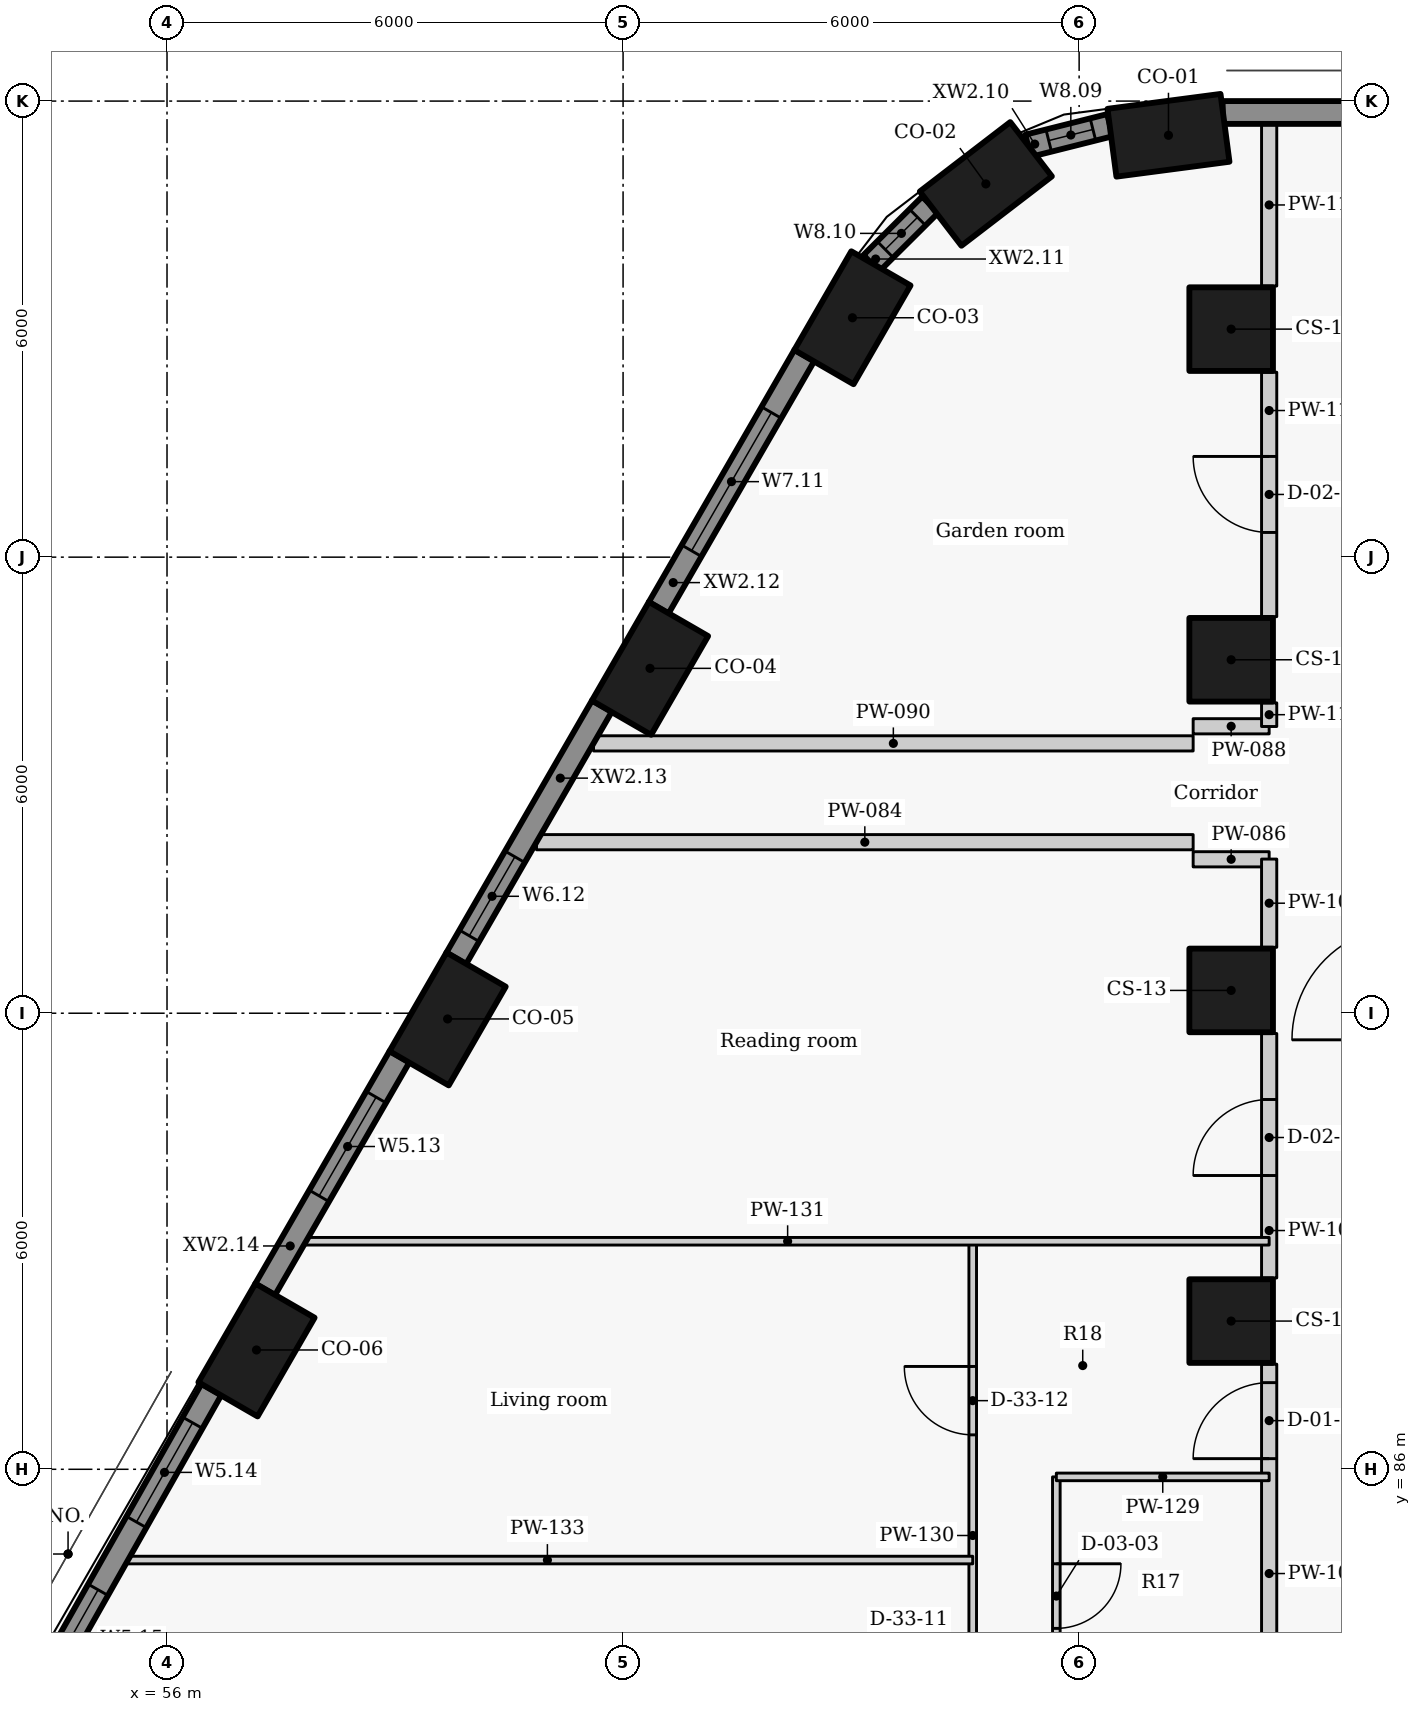
"""IFC4 building model, lengths in metres.
Left out: names, types, materials, properties, quantities, classifications, styles, units other than length and angle.
Written with IfcOpenShell. Run it as: python <this file> out.ifc"""

import sys

from ifc_helpers import new_model, si_unit, direction, frame, frame_2d, origin, origin_2d, place, context, subcontext, project, spatial, rectangle, extrude, element, fill, save


model = new_model("IFC4")
c1 = context("Model", 3, precision=1e-05, world=origin(), true_north=direction((0.0, 1.0)))
c2 = subcontext(c1, "Body", "Model", "MODEL_VIEW")
j1 = project(units=[si_unit("LENGTHUNIT", "METRE"), si_unit("PLANEANGLEUNIT", "RADIAN")], contexts=[c1])
p1 = place(None, origin())
s1 = spatial("IfcSite", under=j1, at=p1, CompositionType="ELEMENT")
p2 = place(p1, origin())
s2 = spatial("IfcBuilding", under=s1, at=p2, CompositionType="ELEMENT")
p3 = place(p2, frame((0.0, 0.0, 67.8)))
s3 = spatial("IfcBuildingStorey", under=s2, at=p3, CompositionType="ELEMENT", Elevation=67.8)
for number, where, z_axis, x_axis in (
    (1, (69.175, 103.55, 0.0), (0.0, 0.0, 1.0), (-0.991, -0.131, 0.0)),
    (2, (66.773, 102.91, 0.0), (0.0, 0.0, 1.0), (-0.793, -0.609, 0.0)),
    (3, (65.018, 101.149, 0.0), (0.0, 0.0, 1.0), (-0.5, -0.866, 0.0)),
    (4, (62.354, 96.537, 0.0), (0.0, 0.0, 1.0), (-0.5, -0.866, 0.0)),
    (5, (59.692, 91.925, 0.0), (0.0, 0.0, 1.0), (-0.5, -0.866, 0.0)),
    (6, (57.177, 87.57, 0.0), (0.0, 0.0, 1.0), (-0.5, -0.866, 0.0)),
):
    element("IfcColumn", number, at=place(p3, frame(where, z_axis=z_axis, x_axis=x_axis)), inside=s3, PredefinedType="COLUMN", context=c2, shape_type="SweptSolid", body=[
        extrude(rectangle(XDim=1.5, YDim=0.9, at=origin_2d()), origin(), (0.0, 0.0, 1.0), 3.3),
    ])
for number, where, z_axis, x_axis in (
    (7, (70.0, 101.0, 0.0), (0.0, 0.0, 1.0), (0.0, -1.0, 0.0)),
    (8, (70.0, 96.65, 0.0), (0.0, 0.0, 1.0), (0.0, -1.0, 0.0)),
    (9, (70.0, 92.3, 0.0), (0.0, 0.0, 1.0), (0.0, -1.0, 0.0)),
    (10, (70.0, 87.95, 0.0), (0.0, 0.0, 1.0), (0.0, -1.0, 0.0)),
):
    element("IfcColumn", number, at=place(p3, frame(where, z_axis=z_axis, x_axis=x_axis)), inside=s3, PredefinedType="COLUMN", context=c2, shape_type="SweptSolid", body=[
        extrude(rectangle(XDim=1.1, YDim=1.1, at=origin_2d()), origin(), (0.0, 0.0, 1.0), 3.3),
    ])
p4 = place(p3, frame((90.079, 103.85, 0.0), z_axis=(0.0, 0.0, 1.0), x_axis=(-1.0, 0.0, 0.0)))
e11 = element("IfcWall", 11, at=p4, inside=s3, PredefinedType="SOLIDWALL", context=c2, shape_type="SweptSolid", body=[
    extrude(rectangle(XDim=20.19, YDim=0.3, at=frame_2d((10.095, 0.0))), origin(), (0.0, 0.0, 1.0), 2.05),
])
p5 = place(p3, frame((68.405, 103.683, 0.0), z_axis=(0.0, 0.0, 1.0), x_axis=(-0.969766298956, -0.244035500304, 0.0)))
e12 = element("IfcWall", 12, at=p5, inside=s3, PredefinedType="SOLIDWALL", context=c2, shape_type="SweptSolid", body=[
    extrude(rectangle(XDim=1.111, YDim=0.3, at=frame_2d((0.555, 0.0))), origin(), (0.0, 0.0, 1.0), 2.05),
])
p6 = place(p5, frame((0.231, 0.0, 0.9)))
e13 = element("IfcOpeningElement", 13, at=p6, cuts=e12, PredefinedType="OPENING", context=c2, shape_type="SweptSolid", body=[
    extrude(rectangle(XDim=0.6, YDim=1.1, at=frame_2d((0.3, 0.55))), frame((0.0, 0.16, 0.0), z_axis=(0.0, -1.0, 0.0), x_axis=(1.0, 0.0, 0.0)), (0.0, 0.0, 1.0), 0.32),
])
p7 = place(p3, frame((66.042, 102.637, 0.0), z_axis=(0.0, 0.0, 1.0), x_axis=(-0.708892395813, -0.705316646024, 0.0)))
e14 = element("IfcWall", 14, at=p7, inside=s3, PredefinedType="SOLIDWALL", context=c2, shape_type="SweptSolid", body=[
    extrude(rectangle(XDim=1.093, YDim=0.3, at=frame_2d((0.546, 0.0))), origin(), (0.0, 0.0, 1.0), 2.05),
])
p8 = place(p7, frame((0.236, 0.0, 0.9)))
e15 = element("IfcOpeningElement", 15, at=p8, cuts=e14, PredefinedType="OPENING", context=c2, shape_type="SweptSolid", body=[
    extrude(rectangle(XDim=0.6, YDim=1.1, at=frame_2d((0.3, 0.55))), frame((0.0, 0.16, 0.0), z_axis=(0.0, -1.0, 0.0), x_axis=(1.0, 0.0, 0.0)), (0.0, 0.0, 1.0), 0.32),
])
p9 = place(p3, frame((64.385, 100.654, 0.0), z_axis=(0.0, 0.0, 1.0), x_axis=(-0.499974163209, -0.866040320149, 0.0)))
e16 = element("IfcWall", 16, at=p9, inside=s3, PredefinedType="SOLIDWALL", context=c2, shape_type="SweptSolid", body=[
    extrude(rectangle(XDim=3.834, YDim=0.3, at=frame_2d((1.917, 0.0))), origin(), (0.0, 0.0, 1.0), 2.05),
])
p10 = place(p9, frame((0.867, 0.0, 0.9)))
e17 = element("IfcOpeningElement", 17, at=p10, cuts=e16, PredefinedType="OPENING", context=c2, shape_type="SweptSolid", body=[
    extrude(rectangle(XDim=2.1, YDim=1.1, at=frame_2d((1.05, 0.55))), frame((0.0, 0.16, 0.0), z_axis=(0.0, -1.0, 0.0), x_axis=(1.0, 0.0, 0.0)), (0.0, 0.0, 1.0), 0.32),
])
p11 = place(p3, frame((61.722, 96.041, 0.0), z_axis=(0.0, 0.0, 1.0), x_axis=(-0.500001735503, -0.866024401789, 0.0)))
e18 = element("IfcWall", 18, at=p11, inside=s3, PredefinedType="SOLIDWALL", context=c2, shape_type="SweptSolid", body=[
    extrude(rectangle(XDim=3.834, YDim=0.3, at=frame_2d((1.917, 0.0))), origin(), (0.0, 0.0, 1.0), 2.05),
])
p12 = place(p11, frame((2.29, 0.0, 0.9)))
e19 = element("IfcOpeningElement", 19, at=p12, cuts=e18, PredefinedType="OPENING", context=c2, shape_type="SweptSolid", body=[
    extrude(rectangle(XDim=1.2, YDim=1.1, at=frame_2d((0.6, 0.55))), frame((0.0, 0.16, 0.0), z_axis=(0.0, -1.0, 0.0), x_axis=(1.0, 0.0, 0.0)), (0.0, 0.0, 1.0), 0.32),
])
p13 = place(p3, frame((59.059, 91.429, 0.0), z_axis=(0.0, 0.0, 1.0), x_axis=(-0.499977402622, -0.866038449993, 0.0)))
e20 = element("IfcWall", 20, at=p13, inside=s3, PredefinedType="SOLIDWALL", context=c2, shape_type="SweptSolid", body=[
    extrude(rectangle(XDim=3.537, YDim=0.3, at=frame_2d((1.769, 0.0))), origin(), (0.0, 0.0, 1.0), 2.05),
])
p14 = place(p13, frame((0.615, 0.0, 0.9)))
e21 = element("IfcOpeningElement", 21, at=p14, cuts=e20, PredefinedType="OPENING", context=c2, shape_type="SweptSolid", body=[
    extrude(rectangle(XDim=1.5, YDim=1.1, at=frame_2d((0.75, 0.55))), frame((0.0, 0.16, 0.0), z_axis=(0.0, -1.0, 0.0), x_axis=(1.0, 0.0, 0.0)), (0.0, 0.0, 1.0), 0.32),
])
p15 = place(p3, frame((56.584, 87.051, 0.0), z_axis=(0.0, 0.0, 1.0), x_axis=(-0.492363204642, -0.870389840655, 0.0)))
e22 = element("IfcWall", 22, at=p15, inside=s3, PredefinedType="SOLIDWALL", context=c2, shape_type="SweptSolid", body=[
    extrude(rectangle(XDim=5.626, YDim=0.3, at=frame_2d((2.813, 0.0))), origin(), (0.0, 0.0, 1.0), 2.05),
])
p16 = place(p15, frame((0.504, 0.0, 0.9)))
e23 = element("IfcOpeningElement", 23, at=p16, cuts=e22, PredefinedType="OPENING", context=c2, shape_type="SweptSolid", body=[
    extrude(rectangle(XDim=1.5, YDim=1.1, at=frame_2d((0.75, 0.55))), frame((0.0, 0.16, 0.0), z_axis=(0.0, -1.0, 0.0), x_axis=(1.0, 0.0, 0.0)), (0.0, 0.0, 1.0), 0.32),
])
p17 = place(p15, frame((3.028, 0.0, 0.9)))
e24 = element("IfcOpeningElement", 24, at=p17, cuts=e22, PredefinedType="OPENING", context=c2, shape_type="SweptSolid", body=[
    extrude(rectangle(XDim=1.5, YDim=1.1, at=frame_2d((0.75, 0.55))), frame((0.0, 0.16, 0.0), z_axis=(0.0, -1.0, 0.0), x_axis=(1.0, 0.0, 0.0)), (0.0, 0.0, 1.0), 0.32),
])
p18 = place(p3, frame((60.861, 94.25, 0.0), z_axis=(0.0, 0.0, 1.0), x_axis=(1.0, 0.0, 0.0)))
e25 = element("IfcWall", 25, at=p18, inside=s3, PredefinedType="PARTITIONING", context=c2, shape_type="SweptSolid", body=[
    extrude(rectangle(XDim=8.639, YDim=0.2, at=frame_2d((4.32, 0.0))), origin(), (0.0, 0.0, 1.0), 2.03),
])
for number, where, z_axis, x_axis in (
    (26, (69.5, 94.025, 0.0), (0.0, 0.0, 1.0), (1.0, 0.0, 0.0)),
    (27, (69.5, 95.775, 0.0), (0.0, 0.0, 1.0), (1.0, 0.0, 0.0)),
):
    element("IfcWall", number, at=place(p3, frame(where, z_axis=z_axis, x_axis=x_axis)), inside=s3, PredefinedType="PARTITIONING", context=c2, shape_type="SweptSolid", body=[
        extrude(rectangle(XDim=1.0, YDim=0.2, at=frame_2d((0.5, 0.0))), origin(), (0.0, 0.0, 1.0), 2.43),
    ])
p19 = place(p3, frame((61.611, 95.55, 0.0), z_axis=(0.0, 0.0, 1.0), x_axis=(1.0, 0.0, 0.0)))
e28 = element("IfcWall", 28, at=p19, inside=s3, PredefinedType="PARTITIONING", context=c2, shape_type="SweptSolid", body=[
    extrude(rectangle(XDim=7.889, YDim=0.2, at=frame_2d((3.944, 0.0))), origin(), (0.0, 0.0, 1.0), 2.03),
])
p20 = place(p3, frame((70.5, 83.217, 0.0), z_axis=(0.0, 0.0, 1.0), x_axis=(0.0, 1.0, 0.0)))
e29 = element("IfcWall", 29, at=p20, inside=s3, PredefinedType="PARTITIONING", context=c2, shape_type="SweptSolid", body=[
    extrude(rectangle(XDim=4.166, YDim=0.2, at=frame_2d((2.083, 0.0))), origin(), (0.0, 0.0, 1.0), 2.95),
])
p21 = place(p20, frame((2.923, 0.0, 0.0)))
e30 = element("IfcOpeningElement", 30, at=p21, cuts=e29, PredefinedType="OPENING", context=c2, shape_type="SweptSolid", body=[
    extrude(rectangle(XDim=1.0, YDim=2.1, at=frame_2d((0.5, 1.05))), frame((0.0, 0.11, 0.0), z_axis=(0.0, -1.0, 0.0), x_axis=(1.0, 0.0, 0.0)), (0.0, 0.0, 1.0), 0.22),
])
p22 = place(p3, frame((70.5, 88.517, 0.0), z_axis=(0.0, 0.0, 1.0), x_axis=(0.0, 1.0, 0.0)))
e31 = element("IfcWall", 31, at=p22, inside=s3, PredefinedType="PARTITIONING", context=c2, shape_type="SweptSolid", body=[
    extrude(rectangle(XDim=3.216, YDim=0.2, at=frame_2d((1.608, 0.0))), origin(), (0.0, 0.0, 1.0), 2.95),
])
p23 = place(p22, frame((1.348, 0.0, 0.0)))
e32 = element("IfcOpeningElement", 32, at=p23, cuts=e31, PredefinedType="OPENING", context=c2, shape_type="SweptSolid", body=[
    extrude(rectangle(XDim=1.0, YDim=2.1, at=frame_2d((0.5, 1.05))), frame((0.0, 0.11, 0.0), z_axis=(0.0, -1.0, 0.0), x_axis=(1.0, 0.0, 0.0)), (0.0, 0.0, 1.0), 0.22),
])
p24 = place(p3, frame((70.5, 92.867, 0.0), z_axis=(0.0, 0.0, 1.0), x_axis=(0.0, 1.0, 0.0)))
e33 = element("IfcWall", 33, at=p24, inside=s3, PredefinedType="PARTITIONING", context=c2, shape_type="SweptSolid", body=[
    extrude(rectangle(XDim=1.161, YDim=0.2, at=frame_2d((0.581, 0.0))), origin(), (0.0, 0.0, 1.0), 2.95),
])
p25 = place(p3, frame((70.5, 95.772, 0.0), z_axis=(0.0, 0.0, 1.0), x_axis=(0.0, 1.0, 0.0)))
e34 = element("IfcWall", 34, at=p25, inside=s3, PredefinedType="PARTITIONING", context=c2, shape_type="SweptSolid", body=[
    extrude(rectangle(XDim=0.311, YDim=0.2, at=frame_2d((0.156, 0.0))), origin(), (0.0, 0.0, 1.0), 2.95),
])
p26 = place(p3, frame((70.5, 97.217, 0.0), z_axis=(0.0, 0.0, 1.0), x_axis=(0.0, 1.0, 0.0)))
e35 = element("IfcWall", 35, at=p26, inside=s3, PredefinedType="PARTITIONING", context=c2, shape_type="SweptSolid", body=[
    extrude(rectangle(XDim=3.216, YDim=0.2, at=frame_2d((1.608, 0.0))), origin(), (0.0, 0.0, 1.0), 2.95),
])
p27 = place(p26, frame((1.108, 0.0, 0.0)))
e36 = element("IfcOpeningElement", 36, at=p27, cuts=e35, PredefinedType="OPENING", context=c2, shape_type="SweptSolid", body=[
    extrude(rectangle(XDim=1.0, YDim=2.1, at=frame_2d((0.5, 1.05))), frame((0.0, 0.11, 0.0), z_axis=(0.0, -1.0, 0.0), x_axis=(1.0, 0.0, 0.0)), (0.0, 0.0, 1.0), 0.22),
])
p28 = place(p3, frame((70.5, 101.567, 0.0), z_axis=(0.0, 0.0, 1.0), x_axis=(0.0, 1.0, 0.0)))
e37 = element("IfcWall", 37, at=p28, inside=s3, PredefinedType="PARTITIONING", context=c2, shape_type="SweptSolid", body=[
    extrude(rectangle(XDim=2.133, YDim=0.2, at=frame_2d((1.066, 0.0))), origin(), (0.0, 0.0, 1.0), 2.95),
])
p29 = place(p3, frame((67.7, 85.9, 0.0), z_axis=(0.0, 0.0, 1.0), x_axis=(0.0, -1.0, 0.0)))
e38 = element("IfcWall", 38, at=p29, inside=s3, PredefinedType="PARTITIONING", context=c2, shape_type="SweptSolid", body=[
    extrude(rectangle(XDim=6.9, YDim=0.1, at=frame_2d((3.45, 0.0))), origin(), (0.0, 0.0, 1.0), 2.95),
])
p30 = place(p29, frame((4.568, 0.0, 0.0)))
e39 = element("IfcOpeningElement", 39, at=p30, cuts=e38, PredefinedType="OPENING", context=c2, shape_type="SweptSolid", body=[
    extrude(rectangle(XDim=0.9, YDim=2.1, at=frame_2d((0.45, 1.05))), frame((0.0, 0.06, 0.0), z_axis=(0.0, -1.0, 0.0), x_axis=(1.0, 0.0, 0.0)), (0.0, 0.0, 1.0), 0.12),
])
p31 = place(p29, frame((1.143, 0.0, 0.0)))
e40 = element("IfcOpeningElement", 40, at=p31, cuts=e38, PredefinedType="OPENING", context=c2, shape_type="SweptSolid", body=[
    extrude(rectangle(XDim=0.85, YDim=2.1, at=frame_2d((0.425, 1.05))), frame((0.0, 0.06, 0.0), z_axis=(0.0, -1.0, 0.0), x_axis=(1.0, 0.0, 0.0)), (0.0, 0.0, 1.0), 0.12),
])
p32 = place(p3, frame((67.7, 85.9, 0.0), z_axis=(0.0, 0.0, 1.0), x_axis=(1.0, 0.0, 0.0)))
e41 = element("IfcWall", 41, at=p32, inside=s3, PredefinedType="PARTITIONING", context=c2, shape_type="SweptSolid", body=[
    extrude(rectangle(XDim=2.8, YDim=0.1, at=frame_2d((1.4, 0.0))), origin(), (0.0, 0.0, 1.0), 2.43),
])
p33 = place(p3, frame((66.6, 79.0, 0.0), z_axis=(0.0, 0.0, 1.0), x_axis=(0.0, 1.0, 0.0)))
e42 = element("IfcWall", 42, at=p33, inside=s3, PredefinedType="PARTITIONING", context=c2, shape_type="SweptSolid", body=[
    extrude(rectangle(XDim=10.0, YDim=0.1, at=frame_2d((5.0, 0.0))), origin(), (0.0, 0.0, 1.0), 2.95),
])
p34 = place(p33, frame((1.002, 0.0, 0.0)))
e43 = element("IfcOpeningElement", 43, at=p34, cuts=e42, PredefinedType="OPENING", context=c2, shape_type="SweptSolid", body=[
    extrude(rectangle(XDim=0.9, YDim=2.1, at=frame_2d((0.45, 1.05))), frame((0.0, 0.06, 0.0), z_axis=(0.0, -1.0, 0.0), x_axis=(1.0, 0.0, 0.0)), (0.0, 0.0, 1.0), 0.12),
])
p35 = place(p33, frame((3.905, 0.0, 0.0)))
e44 = element("IfcOpeningElement", 44, at=p35, cuts=e42, PredefinedType="OPENING", context=c2, shape_type="SweptSolid", body=[
    extrude(rectangle(XDim=0.9, YDim=2.1, at=frame_2d((0.45, 1.05))), frame((0.0, 0.06, 0.0), z_axis=(0.0, -1.0, 0.0), x_axis=(1.0, 0.0, 0.0)), (0.0, 0.0, 1.0), 0.12),
])
p36 = place(p33, frame((7.453, 0.0, 0.0)))
e45 = element("IfcOpeningElement", 45, at=p36, cuts=e42, PredefinedType="OPENING", context=c2, shape_type="SweptSolid", body=[
    extrude(rectangle(XDim=0.9, YDim=2.1, at=frame_2d((0.45, 1.05))), frame((0.0, 0.06, 0.0), z_axis=(0.0, -1.0, 0.0), x_axis=(1.0, 0.0, 0.0)), (0.0, 0.0, 1.0), 0.12),
])
p37 = place(p3, frame((57.83, 89.0, 0.0), z_axis=(0.0, 0.0, 1.0), x_axis=(1.0, 0.0, 0.0)))
e46 = element("IfcWall", 46, at=p37, inside=s3, PredefinedType="PARTITIONING", context=c2, shape_type="SweptSolid", body=[
    extrude(rectangle(XDim=12.67, YDim=0.1, at=frame_2d((6.335, 0.0))), origin(), (0.0, 0.0, 1.0), 2.03),
])
p38 = place(p3, frame((55.409, 84.806, 0.0), z_axis=(0.0, 0.0, 1.0), x_axis=(1.0, 0.0, 0.0)))
e47 = element("IfcWall", 47, at=p38, inside=s3, PredefinedType="PARTITIONING", context=c2, shape_type="SweptSolid", body=[
    extrude(rectangle(XDim=11.191, YDim=0.1, at=frame_2d((5.596, 0.0))), origin(), (0.0, 0.0, 1.0), 2.03),
])
p39 = place(p6, origin())
e48 = element("IfcWindow", 48, at=p39, inside=s3, PartitioningType="SINGLE_PANEL", PredefinedType="WINDOW", context=c2, shape_type="SweptSolid", body=[
    extrude(rectangle(XDim=0.6, YDim=1.1, at=frame_2d((0.3, 0.55))), frame((0.0, 0.03, 0.0), z_axis=(0.0, -1.0, 0.0), x_axis=(1.0, 0.0, 0.0)), (0.0, 0.0, 1.0), 0.06),
])
fill(e13, e48)
p40 = place(p8, origin())
e49 = element("IfcWindow", 49, at=p40, inside=s3, PartitioningType="SINGLE_PANEL", PredefinedType="WINDOW", context=c2, shape_type="SweptSolid", body=[
    extrude(rectangle(XDim=0.6, YDim=1.1, at=frame_2d((0.3, 0.55))), frame((0.0, 0.03, 0.0), z_axis=(0.0, -1.0, 0.0), x_axis=(1.0, 0.0, 0.0)), (0.0, 0.0, 1.0), 0.06),
])
fill(e15, e49)
p41 = place(p10, origin())
e50 = element("IfcWindow", 50, at=p41, inside=s3, PartitioningType="SINGLE_PANEL", PredefinedType="WINDOW", context=c2, shape_type="SweptSolid", body=[
    extrude(rectangle(XDim=2.1, YDim=1.1, at=frame_2d((1.05, 0.55))), frame((0.0, 0.03, 0.0), z_axis=(0.0, -1.0, 0.0), x_axis=(1.0, 0.0, 0.0)), (0.0, 0.0, 1.0), 0.06),
])
fill(e17, e50)
p42 = place(p12, origin())
e51 = element("IfcWindow", 51, at=p42, inside=s3, PartitioningType="SINGLE_PANEL", PredefinedType="WINDOW", context=c2, shape_type="SweptSolid", body=[
    extrude(rectangle(XDim=1.2, YDim=1.1, at=frame_2d((0.6, 0.55))), frame((0.0, 0.03, 0.0), z_axis=(0.0, -1.0, 0.0), x_axis=(1.0, 0.0, 0.0)), (0.0, 0.0, 1.0), 0.06),
])
fill(e19, e51)
p43 = place(p14, origin())
e52 = element("IfcWindow", 52, at=p43, inside=s3, PartitioningType="SINGLE_PANEL", PredefinedType="WINDOW", context=c2, shape_type="SweptSolid", body=[
    extrude(rectangle(XDim=1.5, YDim=1.1, at=frame_2d((0.75, 0.55))), frame((0.0, 0.03, 0.0), z_axis=(0.0, -1.0, 0.0), x_axis=(1.0, 0.0, 0.0)), (0.0, 0.0, 1.0), 0.06),
])
fill(e21, e52)
p44 = place(p16, origin())
e53 = element("IfcWindow", 53, at=p44, inside=s3, PartitioningType="SINGLE_PANEL", PredefinedType="WINDOW", context=c2, shape_type="SweptSolid", body=[
    extrude(rectangle(XDim=1.5, YDim=1.1, at=frame_2d((0.75, 0.55))), frame((0.0, 0.03, 0.0), z_axis=(0.0, -1.0, 0.0), x_axis=(1.0, 0.0, 0.0)), (0.0, 0.0, 1.0), 0.06),
])
fill(e23, e53)
p45 = place(p17, origin())
e54 = element("IfcWindow", 54, at=p45, inside=s3, PartitioningType="SINGLE_PANEL", PredefinedType="WINDOW", context=c2, shape_type="SweptSolid", body=[
    extrude(rectangle(XDim=1.5, YDim=1.1, at=frame_2d((0.75, 0.55))), frame((0.0, 0.03, 0.0), z_axis=(0.0, -1.0, 0.0), x_axis=(1.0, 0.0, 0.0)), (0.0, 0.0, 1.0), 0.06),
])
fill(e24, e54)
p46 = place(p21, origin())
e55 = element("IfcDoor", 55, at=p46, inside=s3, OperationType="SINGLE_SWING_LEFT", PredefinedType="DOOR", context=c2, shape_type="SweptSolid", body=[
    extrude(rectangle(XDim=1.0, YDim=2.1, at=frame_2d((0.5, 1.05))), frame((0.0, 0.025, 0.0), z_axis=(0.0, -1.0, 0.0), x_axis=(1.0, 0.0, 0.0)), (0.0, 0.0, 1.0), 0.05),
])
fill(e30, e55)
p47 = place(p31, origin())
e56 = element("IfcDoor", 56, at=p47, inside=s3, OperationType="SINGLE_SWING_LEFT", PredefinedType="DOOR", context=c2, shape_type="SweptSolid", body=[
    extrude(rectangle(XDim=0.85, YDim=2.1, at=frame_2d((0.425, 1.05))), frame((0.0, 0.025, 0.0), z_axis=(0.0, -1.0, 0.0), x_axis=(1.0, 0.0, 0.0)), (0.0, 0.0, 1.0), 0.05),
])
fill(e40, e56)
p48 = place(p36, origin())
e57 = element("IfcDoor", 57, at=p48, inside=s3, OperationType="SINGLE_SWING_RIGHT", PredefinedType="DOOR", context=c2, shape_type="SweptSolid", body=[
    extrude(rectangle(XDim=0.9, YDim=2.1, at=frame_2d((0.45, 1.05))), frame((0.0, 0.025, 0.0), z_axis=(0.0, -1.0, 0.0), x_axis=(1.0, 0.0, 0.0)), (0.0, 0.0, 1.0), 0.05),
])
fill(e45, e57)
p49 = place(p23, origin())
e58 = element("IfcDoor", 58, at=p49, inside=s3, OperationType="SINGLE_SWING_LEFT", PredefinedType="DOOR", context=c2, shape_type="SweptSolid", body=[
    extrude(rectangle(XDim=1.0, YDim=2.1, at=frame_2d((0.5, 1.05))), frame((0.0, 0.025, 0.0), z_axis=(0.0, -1.0, 0.0), x_axis=(1.0, 0.0, 0.0)), (0.0, 0.0, 1.0), 0.05),
])
fill(e32, e58)
p50 = place(p27, origin())
e59 = element("IfcDoor", 59, at=p50, inside=s3, OperationType="SINGLE_SWING_RIGHT", PredefinedType="DOOR", context=c2, shape_type="SweptSolid", body=[
    extrude(rectangle(XDim=1.0, YDim=2.1, at=frame_2d((0.5, 1.05))), frame((0.0, 0.025, 0.0), z_axis=(0.0, -1.0, 0.0), x_axis=(1.0, 0.0, 0.0)), (0.0, 0.0, 1.0), 0.05),
])
fill(e36, e59)
save(model, sys.argv[1])
